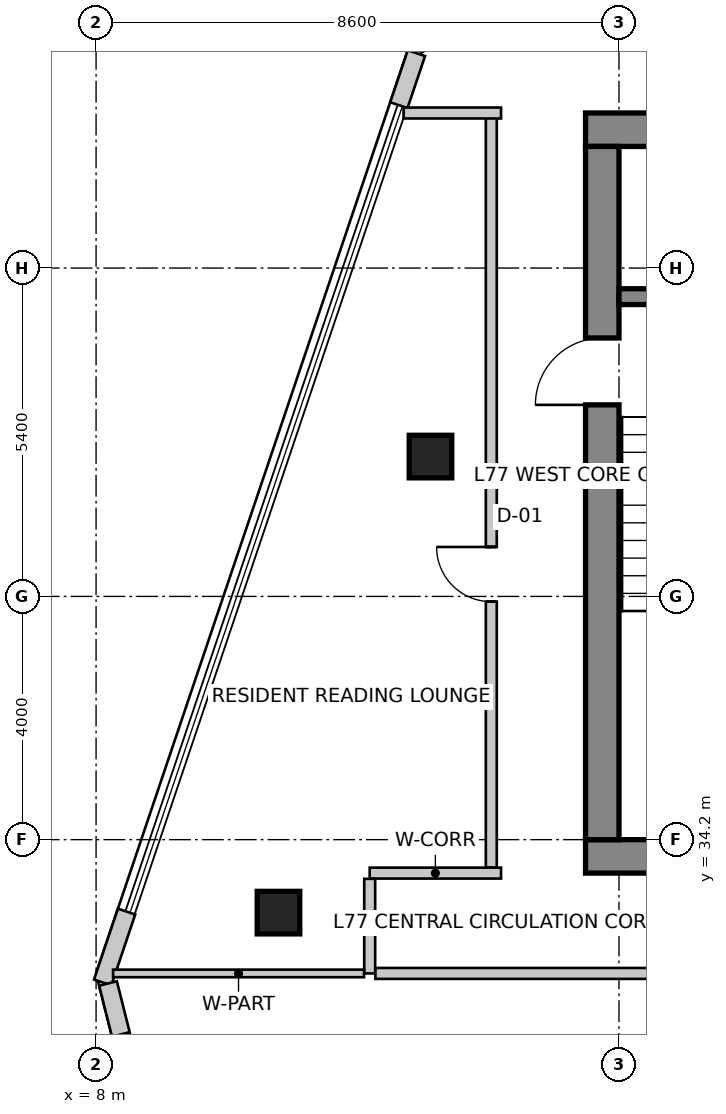
"""IFC4 building model, lengths in metres.
Left out: names, types, materials, properties, quantities, classifications, styles, units other than length and angle.
Written with IfcOpenShell. Run it as: python <this file> out.ifc"""

import sys

from ifc_helpers import new_model, si_unit, direction, frame, frame_2d, origin, origin_2d, place, context, subcontext, project, spatial, rectangle, extrude, source, transform, mapped, element, fill, save


model = new_model("IFC4")
c1 = context("Model", 3, precision=1e-05, world=origin(), true_north=direction((0.0, 1.0)))
c2 = subcontext(c1, "Body", "Model", "MODEL_VIEW")
j1 = project(units=[si_unit("LENGTHUNIT", "METRE"), si_unit("PLANEANGLEUNIT", "RADIAN")], contexts=[c1])
p1 = place(None, origin())
s1 = spatial("IfcSite", under=j1, at=p1, CompositionType="ELEMENT")
p2 = place(p1, origin())
s2 = spatial("IfcBuilding", under=s1, at=p2, CompositionType="ELEMENT")
p3 = place(p2, frame((0.0, 0.0, 300.5)))
s3 = spatial("IfcBuildingStorey", under=s2, at=p3, CompositionType="ELEMENT", Elevation=300.5)
p4 = place(p3, frame((16.05, 45.875, 0.0), z_axis=(0.0, 0.0, 1.0), x_axis=(1.0, 0.0, 0.0)))
e1 = element("IfcWall", 1, at=p4, inside=s3, PredefinedType="SHEAR", context=c2, shape_type="SweptSolid", body=[
    extrude(rectangle(XDim=15.5, YDim=0.55, at=frame_2d((7.75, 0.0))), origin(), (0.0, 0.0, 1.0), 4.0),
])
p5 = place(p3, frame((16.05, 33.925, 0.0), z_axis=(0.0, 0.0, 1.0), x_axis=(1.0, 0.0, 0.0)))
e2 = element("IfcWall", 2, at=p5, inside=s3, PredefinedType="SHEAR", context=c2, shape_type="SweptSolid", body=[
    extrude(rectangle(XDim=15.5, YDim=0.55, at=frame_2d((7.75, 0.0))), origin(), (0.0, 0.0, 1.0), 4.0),
])
m1 = source(origin(), c2, "Body", "SweptSolid", [
    extrude(rectangle(XDim=1.1, YDim=2.15, at=frame_2d((0.55, 1.075))), frame((0.0, 0.285, 0.0), z_axis=(0.0, -1.0, 0.0), x_axis=(1.0, 0.0, 0.0)), (0.0, 0.0, 1.0), 0.57),
])
p6 = place(p5, frame((9.98, 0.0, 0.0)))
e3 = element("IfcOpeningElement", 3, at=p6, cuts=e2, PredefinedType="OPENING", context=c2, shape_type="MappedRepresentation", body=[
    mapped(m1, transform((0.0, 0.0, 0.0), scale=1.0)),
])
p7 = place(p3, frame((16.325, 34.2, 0.0), z_axis=(0.0, 0.0, 1.0), x_axis=(0.0, 1.0, 0.0)))
e4 = element("IfcWall", 4, at=p7, inside=s3, PredefinedType="SHEAR", context=c2, shape_type="SweptSolid", body=[
    extrude(rectangle(XDim=11.4, YDim=0.55, at=frame_2d((5.7, 0.0))), origin(), (0.0, 0.0, 1.0), 4.0),
])
p8 = place(p7, frame((7.15, 0.0, 0.0)))
e5 = element("IfcOpeningElement", 5, at=p8, cuts=e4, PredefinedType="OPENING", context=c2, shape_type="MappedRepresentation", body=[
    mapped(m1, transform((0.0, 0.0, 0.0), scale=1.0)),
])
p9 = place(p3, frame((16.6, 43.13, 0.0), z_axis=(0.0, 0.0, 1.0), x_axis=(1.0, 0.0, 0.0)))
e6 = element("IfcWall", 6, at=p9, inside=s3, PredefinedType="SHEAR", context=c2, shape_type="SweptSolid", body=[
    extrude(rectangle(XDim=3.5, YDim=0.26, at=frame_2d((1.75, 0.0))), origin(), (0.0, 0.0, 1.0), 4.0),
])
m2 = source(origin(), c2, "Body", "SweptSolid", [
    extrude(rectangle(XDim=0.7, YDim=0.7, at=origin_2d()), origin(), (0.0, 0.0, 1.0), 4.0),
])
for number, where, z_axis, x_axis in (
    (7, (11.0, 33.0, 0.0), (0.0, 0.0, 1.0), (1.0, 0.0, 0.0)),
    (8, (13.5, 40.5, 0.0), (0.0, 0.0, 1.0), (1.0, 0.0, 0.0)),
):
    element("IfcColumn", number, at=place(p3, frame(where, z_axis=z_axis, x_axis=x_axis)), inside=s3, PredefinedType="COLUMN", context=c2, shape_type="MappedRepresentation", body=[
        mapped(m2, transform((0.0, 0.0, 0.0), scale=1.0)),
    ])
p10 = place(p3, frame((21.873, 52.741, 0.0), z_axis=(0.0, 0.0, 1.0), x_axis=(-0.843661487732, -0.536875492193, 0.0)))
e9 = element("IfcWall", 9, at=p10, inside=s3, PredefinedType="SOLIDWALL", context=c2, shape_type="SweptSolid", body=[
    extrude(rectangle(XDim=10.282, YDim=0.3, at=frame_2d((5.141, 0.0))), origin(), (0.0, 0.0, 1.0), 3.7),
])
m3 = source(origin(), c2, "Body", "SweptSolid", [
    extrude(rectangle(XDim=2.8, YDim=2.4, at=frame_2d((1.4, 1.2))), frame((0.0, 0.16, 0.0), z_axis=(0.0, -1.0, 0.0), x_axis=(1.0, 0.0, 0.0)), (0.0, 0.0, 1.0), 0.32),
])
p11 = place(p10, frame((1.06, 0.0, 0.85)))
e10 = element("IfcOpeningElement", 10, at=p11, cuts=e9, PredefinedType="OPENING", context=c2, shape_type="MappedRepresentation", body=[
    mapped(m3, transform((0.0, 0.0, 0.0), scale=1.0)),
])
m4 = source(origin(), c2, "Body", "SweptSolid", [
    extrude(rectangle(XDim=2.4, YDim=2.2, at=frame_2d((1.2, 1.1))), frame((0.0, 0.16, 0.0), z_axis=(0.0, -1.0, 0.0), x_axis=(1.0, 0.0, 0.0)), (0.0, 0.0, 1.0), 0.32),
])
p12 = place(p10, frame((5.539, 0.0, 0.85)))
e11 = element("IfcOpeningElement", 11, at=p12, cuts=e9, PredefinedType="OPENING", context=c2, shape_type="MappedRepresentation", body=[
    mapped(m4, transform((0.0, 0.0, 0.0), scale=1.0)),
])
p13 = place(p3, frame((13.269, 47.134, 0.0), z_axis=(0.0, 0.0, 1.0), x_axis=(-0.31995770778, -0.947431826166, 0.0)))
e12 = element("IfcWall", 12, at=p13, inside=s3, PredefinedType="SOLIDWALL", context=c2, shape_type="SweptSolid", body=[
    extrude(rectangle(XDim=0.903, YDim=0.3, at=frame_2d((0.451, 0.0))), origin(), (0.0, 0.0, 1.0), 3.7),
])
p14 = place(p3, frame((8.502, 33.017, 0.0), z_axis=(0.0, 0.0, 1.0), x_axis=(-0.319798692732, -0.947485512357, 0.0)))
e13 = element("IfcWall", 13, at=p14, inside=s3, PredefinedType="SOLIDWALL", context=c2, shape_type="SweptSolid", body=[
    extrude(rectangle(XDim=1.23, YDim=0.3, at=frame_2d((0.615, 0.0))), origin(), (0.0, 0.0, 1.0), 3.7),
])
p15 = place(p3, frame((8.196, 31.835, 0.0), z_axis=(0.0, 0.0, 1.0), x_axis=(0.244430846523, -0.969666726906, 0.0)))
e14 = element("IfcWall", 14, at=p15, inside=s3, PredefinedType="SOLIDWALL", context=c2, shape_type="SweptSolid", body=[
    extrude(rectangle(XDim=7.152, YDim=0.3, at=frame_2d((3.576, 0.0))), origin(), (0.0, 0.0, 1.0), 3.7),
])
p16 = place(p15, frame((0.866, 0.0, 0.85)))
e15 = element("IfcOpeningElement", 15, at=p16, cuts=e14, PredefinedType="OPENING", context=c2, shape_type="MappedRepresentation", body=[
    mapped(m3, transform((0.0, 0.0, 0.0), scale=1.0)),
])
m5 = source(origin(), c2, "Body", "SweptSolid", [
    extrude(rectangle(XDim=2.1, YDim=2.0, at=frame_2d((1.05, 1.0))), frame((0.0, 0.16, 0.0), z_axis=(0.0, -1.0, 0.0), x_axis=(1.0, 0.0, 0.0)), (0.0, 0.0, 1.0), 0.32),
])
p17 = place(p15, frame((4.692, 0.0, 0.85)))
e16 = element("IfcOpeningElement", 16, at=p17, cuts=e14, PredefinedType="OPENING", context=c2, shape_type="MappedRepresentation", body=[
    mapped(m5, transform((0.0, 0.0, 0.0), scale=1.0)),
])
p18 = place(p3, frame((12.5, 33.65, 0.0), z_axis=(0.0, 0.0, 1.0), x_axis=(1.0, 0.0, 0.0)))
e17 = element("IfcWall", 17, at=p18, inside=s3, PredefinedType="PARTITIONING", context=c2, shape_type="SweptSolid", body=[
    extrude(rectangle(XDim=2.16, YDim=0.18, at=frame_2d((1.08, 0.0))), origin(), (0.0, 0.0, 1.0), 3.7),
])
p19 = place(p3, frame((12.5, 32.0, 0.0), z_axis=(0.0, 0.0, 1.0), x_axis=(0.0, 1.0, 0.0)))
e18 = element("IfcWall", 18, at=p19, inside=s3, PredefinedType="PARTITIONING", context=c2, shape_type="SweptSolid", body=[
    extrude(rectangle(XDim=1.556, YDim=0.18, at=frame_2d((0.778, 0.0))), origin(), (0.0, 0.0, 1.0), 3.384),
])
p20 = place(p3, frame((26.065, 32.0, 0.0), z_axis=(0.0, 0.0, 1.0), x_axis=(-1.0, 0.0, 0.0)))
e19 = element("IfcWall", 19, at=p20, inside=s3, PredefinedType="PARTITIONING", context=c2, shape_type="SweptSolid", body=[
    extrude(rectangle(XDim=13.471, YDim=0.18, at=frame_2d((6.736, 0.0))), origin(), (0.0, 0.0, 1.0), 3.384),
])
m6 = source(origin(), c2, "Body", "SweptSolid", [
    extrude(rectangle(XDim=1.6, YDim=2.15, at=frame_2d((0.8, 1.075))), frame((0.0, 0.1, 0.0), z_axis=(0.0, -1.0, 0.0), x_axis=(1.0, 0.0, 0.0)), (0.0, 0.0, 1.0), 0.2),
])
p21 = place(p20, frame((5.936, 0.0, 0.0)))
e20 = element("IfcOpeningElement", 20, at=p21, cuts=e19, PredefinedType="OPENING", context=c2, shape_type="MappedRepresentation", body=[
    mapped(m6, transform((0.0, 0.0, 0.0), scale=1.0)),
])
p22 = place(p3, frame((14.5, 33.744, 0.0), z_axis=(0.0, 0.0, 1.0), x_axis=(0.0, 1.0, 0.0)))
e21 = element("IfcWall", 21, at=p22, inside=s3, PredefinedType="PARTITIONING", context=c2, shape_type="SweptSolid", body=[
    extrude(rectangle(XDim=12.406, YDim=0.18, at=frame_2d((6.203, 0.0))), origin(), (0.0, 0.0, 1.0), 3.7),
])
m7 = source(origin(), c2, "Body", "SweptSolid", [
    extrude(rectangle(XDim=0.9, YDim=2.15, at=frame_2d((0.45, 1.075))), frame((0.0, 0.1, 0.0), z_axis=(0.0, -1.0, 0.0), x_axis=(1.0, 0.0, 0.0)), (0.0, 0.0, 1.0), 0.2),
])
p23 = place(p22, frame((4.37, 0.0, 0.0)))
e22 = element("IfcOpeningElement", 22, at=p23, cuts=e21, PredefinedType="OPENING", context=c2, shape_type="MappedRepresentation", body=[
    mapped(m7, transform((0.0, 0.0, 0.0), scale=1.0)),
])
p24 = place(p3, frame((14.66, 46.15, 0.0), z_axis=(0.0, 0.0, 1.0), x_axis=(-1.0, 0.0, 0.0)))
e23 = element("IfcWall", 23, at=p24, inside=s3, PredefinedType="PARTITIONING", context=c2, shape_type="SweptSolid", body=[
    extrude(rectangle(XDim=1.602, YDim=0.18, at=frame_2d((0.801, 0.0))), origin(), (0.0, 0.0, 1.0), 3.7),
])
p25 = place(p3, frame((12.406, 32.0, 0.0), z_axis=(0.0, 0.0, 1.0), x_axis=(-1.0, 0.0, 0.0)))
e24 = element("IfcWall", 24, at=p25, inside=s3, PredefinedType="PARTITIONING", context=c2, shape_type="SweptSolid", body=[
    extrude(rectangle(XDim=4.126, YDim=0.125, at=frame_2d((2.063, 0.0))), origin(), (0.0, 0.0, 1.0), 2.992),
])
m8 = source(origin(), c2, "Body", "SweptSolid", [
    extrude(rectangle(XDim=1.1, YDim=2.15, at=frame_2d((0.55, 1.075))), frame((0.0, 0.025, 0.0), z_axis=(0.0, -1.0, 0.0), x_axis=(1.0, 0.0, 0.0)), (0.0, 0.0, 1.0), 0.05),
])
p26 = place(p8, origin())
e25 = element("IfcDoor", 25, at=p26, inside=s3, OperationType="SINGLE_SWING_LEFT", PredefinedType="DOOR", context=c2, shape_type="MappedRepresentation", body=[
    mapped(m8, transform((0.0, 0.0, 0.0), scale=1.0)),
])
fill(e5, e25)
m9 = source(origin(), c2, "Body", "SweptSolid", [
    extrude(rectangle(XDim=0.9, YDim=2.15, at=frame_2d((0.45, 1.075))), frame((0.0, 0.025, 0.0), z_axis=(0.0, -1.0, 0.0), x_axis=(1.0, 0.0, 0.0)), (0.0, 0.0, 1.0), 0.05),
])
p27 = place(p23, origin())
e26 = element("IfcDoor", 26, at=p27, inside=s3, OperationType="SINGLE_SWING_RIGHT", PredefinedType="DOOR", context=c2, shape_type="MappedRepresentation", body=[
    mapped(m9, transform((0.0, 0.0, 0.0), scale=1.0)),
])
fill(e22, e26)
save(model, sys.argv[1])
